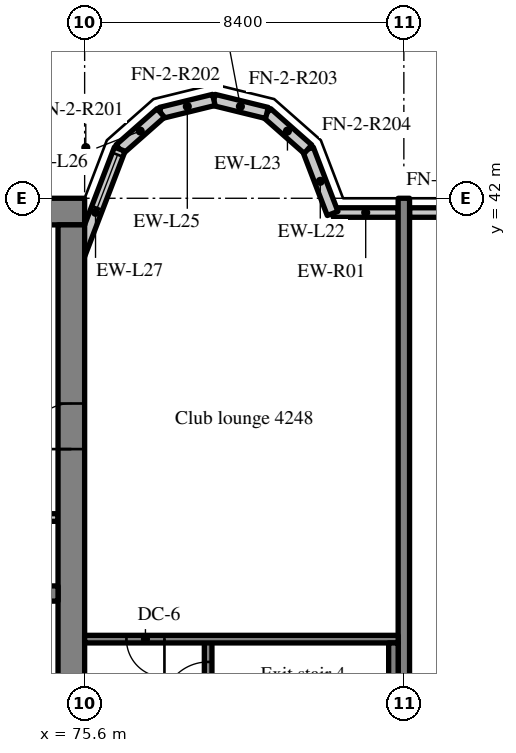
"""IFC4 building model, lengths in metres.
Left out: names, types, materials, properties, quantities, classifications, styles, units other than length and angle.
Written with IfcOpenShell. Run it as: python <this file> out.ifc"""

import sys

from ifc_helpers import new_model, si_unit, direction, frame, frame_2d, origin, place, context, subcontext, project, spatial, rectangle, extrude, source, transform, mapped, element, fill, save


model = new_model("IFC4")
c1 = context("Model", 3, precision=1e-05, world=origin(), true_north=direction((0.0, 1.0)))
c2 = subcontext(c1, "Body", "Model", "MODEL_VIEW")
j1 = project(units=[si_unit("LENGTHUNIT", "METRE"), si_unit("PLANEANGLEUNIT", "RADIAN")], contexts=[c1])
p1 = place(None, origin())
s1 = spatial("IfcSite", under=j1, at=p1, CompositionType="ELEMENT")
p2 = place(p1, origin())
s2 = spatial("IfcBuilding", under=s1, at=p2, CompositionType="ELEMENT")
p3 = place(p2, frame((0.0, 0.0, 174.4)))
s3 = spatial("IfcBuildingStorey", under=s2, at=p3, CompositionType="ELEMENT", Elevation=174.4)
m1 = source(origin(), c2, "Body", "SweptSolid", [
    extrude(rectangle(XDim=50.4, YDim=0.7, at=frame_2d((25.2, 0.0))), origin(), (0.0, 0.0, 1.0), 3.52),
])
p4 = place(p3, frame((25.2, 41.65, 0.0), z_axis=(0.0, 0.0, 1.0), x_axis=(1.0, 0.0, 0.0)))
e1 = element("IfcWall", 1, at=p4, inside=s3, PredefinedType="SHEAR", context=c2, shape_type="MappedRepresentation", body=[
    mapped(m1, transform((0.0, 0.0, 0.0), scale=1.0)),
])
m2 = source(origin(), c2, "Body", "SweptSolid", [
    extrude(rectangle(XDim=18.6, YDim=0.7, at=frame_2d((9.3, 0.0))), origin(), (0.0, 0.0, 1.0), 3.52),
])
p5 = place(p3, frame((75.25, 22.7, 0.0), z_axis=(0.0, 0.0, 1.0), x_axis=(0.0, 1.0, 0.0)))
e2 = element("IfcWall", 2, at=p5, inside=s3, PredefinedType="SHEAR", context=c2, shape_type="MappedRepresentation", body=[
    mapped(m2, transform((0.0, 0.0, 0.0), scale=1.0)),
])
m3 = source(origin(), c2, "Body", "SweptSolid", [
    extrude(rectangle(XDim=1.2, YDim=2.1, at=frame_2d((0.6, 1.05))), frame((0.0, 0.36, 0.0), z_axis=(0.0, -1.0, 0.0), x_axis=(1.0, 0.0, 0.0)), (0.0, 0.0, 1.0), 0.72),
])
p6 = place(p5, frame((12.7, 0.0, 0.0)))
e3 = element("IfcOpeningElement", 3, at=p6, cuts=e2, PredefinedType="OPENING", context=c2, shape_type="MappedRepresentation", body=[
    mapped(m3, transform((0.0, 0.0, 0.0), scale=1.0)),
])
m4 = source(origin(), c2, "Body", "SweptSolid", [
    extrude(rectangle(XDim=7.5, YDim=0.4, at=frame_2d((3.75, 0.0))), origin(), (0.0, 0.0, 1.0), 3.52),
])
p7 = place(p3, frame((67.4, 31.6, 0.0), z_axis=(0.0, 0.0, 1.0), x_axis=(1.0, 0.0, 0.0)))
e4 = element("IfcWall", 4, at=p7, inside=s3, PredefinedType="SHEAR", context=c2, shape_type="MappedRepresentation", body=[
    mapped(m4, transform((0.0, 0.0, 0.0), scale=1.0)),
])
m5 = source(origin(), c2, "Body", "SweptSolid", [
    extrude(rectangle(XDim=1.1, YDim=2.1, at=frame_2d((0.55, 1.05))), frame((0.0, 0.21, 0.0), z_axis=(0.0, -1.0, 0.0), x_axis=(1.0, 0.0, 0.0)), (0.0, 0.0, 1.0), 0.42),
])
p8 = place(p7, frame((5.725, 0.0, 0.0)))
e5 = element("IfcOpeningElement", 5, at=p8, cuts=e4, PredefinedType="OPENING", context=c2, shape_type="MappedRepresentation", body=[
    mapped(m5, transform((0.0, 0.0, 0.0), scale=1.0)),
])
m6 = source(origin(), c2, "Body", "SweptSolid", [
    extrude(rectangle(XDim=20.0, YDim=0.3, at=frame_2d((10.0, 0.0))), origin(), (0.0, 0.0, 1.0), 3.52),
])
p9 = place(p3, frame((84.0, 22.0, 0.0), z_axis=(0.0, 0.0, 1.0), x_axis=(0.0, 1.0, 0.0)))
e6 = element("IfcWall", 6, at=p9, inside=s3, PredefinedType="SHEAR", context=c2, shape_type="MappedRepresentation", body=[
    mapped(m6, transform((0.0, 0.0, 0.0), scale=1.0)),
])
m7 = source(origin(), c2, "Body", "SweptSolid", [
    extrude(rectangle(XDim=1.708, YDim=0.25, at=frame_2d((0.854, 0.0))), origin(), (0.0, 0.0, 1.0), 2.87),
])
p10 = place(p3, frame((83.85, 41.625, 0.0), z_axis=(0.0, 0.0, 1.0), x_axis=(-1.0, 0.0, 0.0)))
e7 = element("IfcWall", 7, at=p10, inside=s3, PredefinedType="SOLIDWALL", context=c2, shape_type="MappedRepresentation", body=[
    mapped(m7, transform((0.0, 0.0, 0.0), scale=1.0)),
])
m8 = source(origin(), c2, "Body", "SweptSolid", [
    extrude(rectangle(XDim=4.095, YDim=0.25, at=frame_2d((2.047, 0.0))), origin(), (0.0, 0.0, 1.0), 2.87),
])
p11 = place(p3, frame((88.245, 41.625, 0.0), z_axis=(0.0, 0.0, 1.0), x_axis=(-1.0, 0.0, 0.0)))
e8 = element("IfcWall", 8, at=p11, inside=s3, PredefinedType="SOLIDWALL", context=c2, shape_type="MappedRepresentation", body=[
    mapped(m8, transform((0.0, 0.0, 0.0), scale=1.0)),
])
m9 = source(origin(), c2, "Body", "SweptSolid", [
    extrude(rectangle(XDim=1.5, YDim=1.5, at=frame_2d((0.75, 0.75))), frame((0.0, 0.135, 0.0), z_axis=(0.0, -1.0, 0.0), x_axis=(1.0, 0.0, 0.0)), (0.0, 0.0, 1.0), 0.27),
])
p12 = place(p11, frame((1.297, 0.0, 0.9)))
e9 = element("IfcOpeningElement", 9, at=p12, cuts=e8, PredefinedType="OPENING", context=c2, shape_type="MappedRepresentation", body=[
    mapped(m9, transform((0.0, 0.0, 0.0), scale=1.0)),
])
m10 = source(origin(), c2, "Body", "SweptSolid", [
    extrude(rectangle(XDim=1.812, YDim=0.3, at=frame_2d((0.906, 0.0))), origin(), (0.0, 0.0, 1.0), 3.52),
])
p13 = place(p3, frame((82.125, 41.6, 0.0), z_axis=(0.0, 0.0, 1.0), x_axis=(-0.357877270961, 0.93376863244, 0.0)))
e10 = element("IfcWall", 10, at=p13, inside=s3, PredefinedType="SOLIDWALL", context=c2, shape_type="MappedRepresentation", body=[
    mapped(m10, transform((0.0, 0.0, 0.0), scale=1.0)),
])
m11 = source(origin(), c2, "Body", "SweptSolid", [
    extrude(rectangle(XDim=1.44, YDim=0.3, at=frame_2d((0.72, 0.0))), origin(), (0.0, 0.0, 1.0), 3.52),
])
p14 = place(p3, frame((81.477, 43.292, 0.0), z_axis=(0.0, 0.0, 1.0), x_axis=(-0.74957555648, 0.661918790432, 0.0)))
e11 = element("IfcWall", 11, at=p14, inside=s3, PredefinedType="SOLIDWALL", context=c2, shape_type="MappedRepresentation", body=[
    mapped(m11, transform((0.0, 0.0, 0.0), scale=1.0)),
])
m12 = source(origin(), c2, "Body", "SweptSolid", [
    extrude(rectangle(XDim=1.439, YDim=0.3, at=frame_2d((0.719, 0.0))), origin(), (0.0, 0.0, 1.0), 3.52),
])
for number, where, z_axis, x_axis in (
    (12, (80.397, 44.245, 0.0), (0.0, 0.0, 1.0), (-0.971, 0.238, 0.0)),
    (13, (79.0, 44.588, 0.0), (0.0, 0.0, 1.0), (-0.971, -0.238, 0.0)),
):
    element("IfcWall", number, at=place(p3, frame(where, z_axis=z_axis, x_axis=x_axis)), inside=s3, PredefinedType="SOLIDWALL", context=c2, shape_type="MappedRepresentation", body=[
        mapped(m12, transform((0.0, 0.0, 0.0), scale=1.0)),
    ])
p15 = place(p3, frame((77.603, 44.245, 0.0), z_axis=(0.0, 0.0, 1.0), x_axis=(-0.74957555648, -0.661918790432, 0.0)))
e14 = element("IfcWall", 14, at=p15, inside=s3, PredefinedType="SOLIDWALL", context=c2, shape_type="MappedRepresentation", body=[
    mapped(m11, transform((0.0, 0.0, 0.0), scale=1.0)),
])
m13 = source(origin(), c2, "Body", "SweptSolid", [
    extrude(rectangle(XDim=3.559, YDim=0.3, at=frame_2d((1.78, 0.0))), origin(), (0.0, 0.0, 1.0), 3.52),
])
p16 = place(p3, frame((76.523, 43.292, 0.0), z_axis=(0.0, 0.0, 1.0), x_axis=(-0.35779745313, -0.933799219604, 0.0)))
e15 = element("IfcWall", 15, at=p16, inside=s3, PredefinedType="SOLIDWALL", context=c2, shape_type="MappedRepresentation", body=[
    mapped(m13, transform((0.0, 0.0, 0.0), scale=1.0)),
])
m14 = source(origin(), c2, "Body", "SweptSolid", [
    extrude(rectangle(XDim=1.5, YDim=2.0, at=frame_2d((0.75, 1.0))), frame((0.0, 0.16, 0.0), z_axis=(0.0, -1.0, 0.0), x_axis=(1.0, 0.0, 0.0)), (0.0, 0.0, 1.0), 0.32),
])
p17 = place(p16, frame((0.156, 0.0, 0.9)))
e16 = element("IfcOpeningElement", 16, at=p17, cuts=e15, PredefinedType="OPENING", context=c2, shape_type="MappedRepresentation", body=[
    mapped(m14, transform((0.0, 0.0, 0.0), scale=1.0)),
])
m15 = source(origin(), c2, "Body", "SweptSolid", [
    extrude(rectangle(XDim=2.45, YDim=0.2, at=frame_2d((1.225, 0.0))), origin(), (0.0, 0.0, 1.0), 3.52),
])
p18 = place(p3, frame((72.45, 33.6, 0.0), z_axis=(0.0, 0.0, 1.0), x_axis=(1.0, 0.0, 0.0)))
e17 = element("IfcWall", 17, at=p18, inside=s3, PredefinedType="SOLIDWALL", context=c2, shape_type="MappedRepresentation", body=[
    mapped(m15, transform((0.0, 0.0, 0.0), scale=1.0)),
])
m16 = source(origin(), c2, "Body", "SweptSolid", [
    extrude(rectangle(XDim=8.3, YDim=0.2, at=frame_2d((4.15, 0.0))), origin(), (0.0, 0.0, 1.0), 3.52),
])
p19 = place(p3, frame((78.85, 22.1, 0.0), z_axis=(0.0, 0.0, 1.0), x_axis=(0.0, 1.0, 0.0)))
e18 = element("IfcWall", 18, at=p19, inside=s3, PredefinedType="SOLIDWALL", context=c2, shape_type="MappedRepresentation", body=[
    mapped(m16, transform((0.0, 0.0, 0.0), scale=1.0)),
])
m17 = source(origin(), c2, "Body", "SweptSolid", [
    extrude(rectangle(XDim=1.2, YDim=2.1, at=frame_2d((0.6, 1.05))), frame((0.0, 0.11, 0.0), z_axis=(0.0, -1.0, 0.0), x_axis=(1.0, 0.0, 0.0)), (0.0, 0.0, 1.0), 0.22),
])
p20 = place(p19, frame((6.5, 0.0, 0.0)))
e19 = element("IfcOpeningElement", 19, at=p20, cuts=e18, PredefinedType="OPENING", context=c2, shape_type="MappedRepresentation", body=[
    mapped(m17, transform((0.0, 0.0, 0.0), scale=1.0)),
])
m18 = source(origin(), c2, "Body", "SweptSolid", [
    extrude(rectangle(XDim=8.25, YDim=0.2, at=frame_2d((4.125, 0.0))), origin(), (0.0, 0.0, 1.0), 3.52),
])
p21 = place(p3, frame((83.85, 30.4, 0.0), z_axis=(0.0, 0.0, 1.0), x_axis=(-1.0, 0.0, 0.0)))
e20 = element("IfcWall", 20, at=p21, inside=s3, PredefinedType="SOLIDWALL", context=c2, shape_type="MappedRepresentation", body=[
    mapped(m18, transform((0.0, 0.0, 0.0), scale=1.0)),
])
m19 = source(origin(), c2, "Body", "SweptSolid", [
    extrude(rectangle(XDim=1.0, YDim=2.1, at=frame_2d((0.5, 1.05))), frame((0.0, 0.11, 0.0), z_axis=(0.0, -1.0, 0.0), x_axis=(1.0, 0.0, 0.0)), (0.0, 0.0, 1.0), 0.22),
])
p22 = place(p21, frame((6.15, 0.0, 0.0)))
e21 = element("IfcOpeningElement", 21, at=p22, cuts=e20, PredefinedType="OPENING", context=c2, shape_type="MappedRepresentation", body=[
    mapped(m19, transform((0.0, 0.0, 0.0), scale=1.0)),
])
m20 = source(origin(), c2, "Body", "SweptSolid", [
    extrude(rectangle(XDim=8.1, YDim=0.25, at=frame_2d((4.05, 0.0))), origin(), (0.0, 0.0, 1.0), 3.52),
])
p23 = place(p3, frame((83.725, 22.2, 0.0), z_axis=(0.0, 0.0, 1.0), x_axis=(0.0, 1.0, 0.0)))
e22 = element("IfcWall", 22, at=p23, inside=s3, PredefinedType="SOLIDWALL", context=c2, shape_type="MappedRepresentation", body=[
    mapped(m20, transform((0.0, 0.0, 0.0), scale=1.0)),
])
m21 = source(origin(), c2, "Body", "SweptSolid", [
    extrude(rectangle(XDim=1.5, YDim=2.0, at=frame_2d((0.75, 1.0))), frame((0.0, 0.03, 0.0), z_axis=(0.0, -1.0, 0.0), x_axis=(1.0, 0.0, 0.0)), (0.0, 0.0, 1.0), 0.06),
])
p24 = place(p17, origin())
e23 = element("IfcWindow", 23, at=p24, inside=s3, PartitioningType="SINGLE_PANEL", PredefinedType="WINDOW", context=c2, shape_type="MappedRepresentation", body=[
    mapped(m21, transform((0.0, 0.0, 0.0), scale=1.0)),
])
fill(e16, e23)
m22 = source(origin(), c2, "Body", "SweptSolid", [
    extrude(rectangle(XDim=1.2, YDim=2.1, at=frame_2d((0.6, 1.05))), frame((0.0, 0.025, 0.0), z_axis=(0.0, -1.0, 0.0), x_axis=(1.0, 0.0, 0.0)), (0.0, 0.0, 1.0), 0.05),
])
p25 = place(p6, origin())
e24 = element("IfcDoor", 24, at=p25, inside=s3, OperationType="SINGLE_SWING_LEFT", PredefinedType="DOOR", context=c2, shape_type="MappedRepresentation", body=[
    mapped(m22, transform((0.0, 0.0, 0.0), scale=1.0)),
])
fill(e3, e24)
p26 = place(p20, origin())
e25 = element("IfcDoor", 25, at=p26, inside=s3, OperationType="SINGLE_SWING_LEFT", PredefinedType="DOOR", context=c2, shape_type="MappedRepresentation", body=[
    mapped(m22, transform((0.0, 0.0, 0.0), scale=1.0)),
])
fill(e19, e25)
m23 = source(origin(), c2, "Body", "SweptSolid", [
    extrude(rectangle(XDim=1.0, YDim=2.1, at=frame_2d((0.5, 1.05))), frame((0.0, 0.025, 0.0), z_axis=(0.0, -1.0, 0.0), x_axis=(1.0, 0.0, 0.0)), (0.0, 0.0, 1.0), 0.05),
])
p27 = place(p22, origin())
e26 = element("IfcDoor", 26, at=p27, inside=s3, OperationType="SINGLE_SWING_LEFT", PredefinedType="DOOR", context=c2, shape_type="MappedRepresentation", body=[
    mapped(m23, transform((0.0, 0.0, 0.0), scale=1.0)),
])
fill(e21, e26)
save(model, sys.argv[1])
